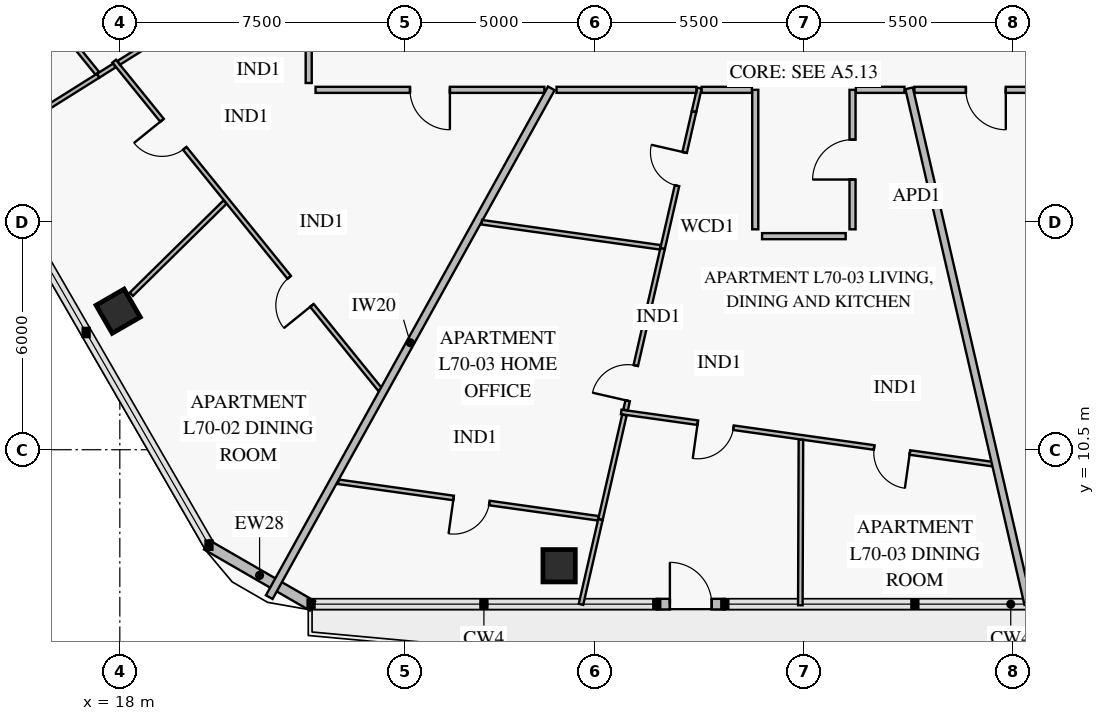
"""IFC4 building model, lengths in metres.
Left out: names, types, materials, properties, quantities, classifications, styles, units other than length and angle.
Written with IfcOpenShell. Run it as: python <this file> out.ifc"""

import sys

from ifc_helpers import new_model, si_unit, direction, frame, frame_2d, origin, origin_2d, place, context, subcontext, project, spatial, rectangle, extrude, element, fill, save


model = new_model("IFC4")
c1 = context("Model", 3, precision=1e-05, world=origin(), true_north=direction((0.0, 1.0)))
c2 = subcontext(c1, "Body", "Model", "MODEL_VIEW")
j1 = project(units=[si_unit("LENGTHUNIT", "METRE"), si_unit("PLANEANGLEUNIT", "RADIAN")], contexts=[c1])
p1 = place(None, origin())
s1 = spatial("IfcSite", under=j1, at=p1, CompositionType="ELEMENT")
p2 = place(p1, origin())
s2 = spatial("IfcBuilding", under=s1, at=p2, CompositionType="ELEMENT")
p3 = place(p2, frame((0.0, 0.0, 276.8)))
s3 = spatial("IfcBuildingStorey", under=s2, at=p3, CompositionType="ELEMENT", Elevation=276.8)
for number, where, z_axis, x_axis in (
    (1, (17.956, 14.145, 0.0), (0.0, 0.0, 1.0), (0.5, -0.866, 0.0)),
    (2, (29.559, 7.446, 0.0), (0.0, 0.0, 1.0), (1.0, 0.0, 0.0)),
):
    element("IfcColumn", number, at=place(p3, frame(where, z_axis=z_axis, x_axis=x_axis)), inside=s3, PredefinedType="COLUMN", context=c2, shape_type="SweptSolid", body=[
        extrude(rectangle(XDim=0.85, YDim=0.85, at=origin_2d()), origin(), (0.0, 0.0, 1.0), 3.55),
    ])
p4 = place(p3, frame((33.919, 6.436, 0.0), z_axis=(0.0, 0.0, 1.0), x_axis=(-1.0, 0.0, 0.0)))
e3 = element("IfcWall", 3, at=p4, inside=s3, PredefinedType="SOLIDWALL", context=c2, shape_type="SweptSolid", body=[
    extrude(rectangle(XDim=1.79, YDim=0.28, at=frame_2d((0.895, 0.0))), origin(), (0.0, 0.0, 1.0), 3.55),
])
p5 = place(p4, frame((0.345, 0.0, 0.0)))
e4 = element("IfcOpeningElement", 4, at=p5, cuts=e3, PredefinedType="OPENING", context=c2, shape_type="SweptSolid", body=[
    extrude(rectangle(XDim=1.1, YDim=2.2, at=frame_2d((0.55, 1.1))), frame((0.0, 0.152, 0.0), z_axis=(0.0, -1.0, 0.0), x_axis=(1.0, 0.0, 0.0)), (0.0, 0.0, 1.0), 0.304),
])
p6 = place(p3, frame((23.07, 6.389, 0.0), z_axis=(0.0, 0.0, 1.0), x_axis=(-0.866028773314, 0.499994163758, 0.0)))
e5 = element("IfcWall", 5, at=p6, inside=s3, PredefinedType="SOLIDWALL", context=c2, shape_type="SweptSolid", body=[
    extrude(rectangle(XDim=3.215, YDim=0.28, at=frame_2d((1.607, 0.0))), origin(), (0.0, 0.0, 1.0), 3.55),
])
p7 = place(p3, frame((17.851, 20.725, 0.0), z_axis=(0.0, 0.0, 1.0), x_axis=(0.629311937349, -0.777152807053, 0.0)))
e6 = element("IfcWall", 6, at=p7, inside=s3, PredefinedType="PARTITIONING", context=c2, shape_type="SweptSolid", body=[
    extrude(rectangle(XDim=11.117, YDim=0.12, at=frame_2d((5.559, 0.0))), origin(), (0.0, 0.0, 1.0), 2.95),
])
p8 = place(p7, frame((2.001, 0.0, 0.0)))
e7 = element("IfcOpeningElement", 7, at=p8, cuts=e6, PredefinedType="OPENING", context=c2, shape_type="SweptSolid", body=[
    extrude(rectangle(XDim=0.95, YDim=2.1, at=frame_2d((0.475, 1.05))), frame((0.0, 0.072, 0.0), z_axis=(0.0, -1.0, 0.0), x_axis=(1.0, 0.0, 0.0)), (0.0, 0.0, 1.0), 0.144),
])
p9 = place(p7, frame((7.319, 0.0, 0.0)))
e8 = element("IfcOpeningElement", 8, at=p9, cuts=e6, PredefinedType="OPENING", context=c2, shape_type="SweptSolid", body=[
    extrude(rectangle(XDim=0.95, YDim=2.1, at=frame_2d((0.475, 1.05))), frame((0.0, 0.072, 0.0), z_axis=(0.0, -1.0, 0.0), x_axis=(1.0, 0.0, 0.0)), (0.0, 0.0, 1.0), 0.144),
])
p10 = place(p3, frame((21.398, 22.833, 0.0), z_axis=(0.0, 0.0, 1.0), x_axis=(-0.84692159597, -0.531717791953, 0.0)))
e9 = element("IfcWall", 9, at=p10, inside=s3, PredefinedType="PARTITIONING", context=c2, shape_type="SweptSolid", body=[
    extrude(rectangle(XDim=4.045, YDim=0.12, at=frame_2d((2.022, 0.0))), origin(), (0.0, 0.0, 1.0), 3.15),
])
p11 = place(p10, frame((1.844, 0.0, 0.0)))
e10 = element("IfcOpeningElement", 10, at=p11, cuts=e9, PredefinedType="OPENING", context=c2, shape_type="SweptSolid", body=[
    extrude(rectangle(XDim=0.95, YDim=2.1, at=frame_2d((0.475, 1.05))), frame((0.0, 0.072, 0.0), z_axis=(0.0, -1.0, 0.0), x_axis=(1.0, 0.0, 0.0)), (0.0, 0.0, 1.0), 0.144),
])
p12 = place(p3, frame((17.857, 20.61, 0.0), z_axis=(0.0, 0.0, 1.0), x_axis=(-0.847021311188, -0.531558932192, 0.0)))
e11 = element("IfcWall", 11, at=p12, inside=s3, PredefinedType="PARTITIONING", context=c2, shape_type="SweptSolid", body=[
    extrude(rectangle(XDim=0.506, YDim=0.12, at=frame_2d((0.253, 0.0))), origin(), (0.0, 0.0, 1.0), 3.55),
])
p13 = place(p3, frame((13.642, 25.055, 0.0), z_axis=(0.0, 0.0, 1.0), x_axis=(0.629353217971, -0.777119377593, 0.0)))
e12 = element("IfcWall", 12, at=p13, inside=s3, PredefinedType="PARTITIONING", context=c2, shape_type="SweptSolid", body=[
    extrude(rectangle(XDim=5.981, YDim=0.12, at=frame_2d((2.99, 0.0))), origin(), (0.0, 0.0, 1.0), 3.55),
])
p14 = place(p13, frame((2.6, 0.0, 0.0)))
e13 = element("IfcOpeningElement", 13, at=p14, cuts=e12, PredefinedType="OPENING", context=c2, shape_type="SweptSolid", body=[
    extrude(rectangle(XDim=0.95, YDim=2.1, at=frame_2d((0.475, 1.05))), frame((0.0, 0.072, 0.0), z_axis=(0.0, -1.0, 0.0), x_axis=(1.0, 0.0, 0.0)), (0.0, 0.0, 1.0), 0.144),
])
p15 = place(p3, frame((23.15, 19.97, 0.0), z_axis=(0.0, 0.0, 1.0), x_axis=(1.0, 0.0, 0.0)))
e14 = element("IfcWall", 14, at=p15, inside=s3, PredefinedType="PARTITIONING", context=c2, shape_type="SweptSolid", body=[
    extrude(rectangle(XDim=6.021, YDim=0.16, at=frame_2d((3.01, 0.0))), origin(), (0.0, 0.0, 1.0), 2.95),
])
p16 = place(p15, frame((2.485, 0.0, 0.0)))
e15 = element("IfcOpeningElement", 15, at=p16, cuts=e14, PredefinedType="OPENING", context=c2, shape_type="SweptSolid", body=[
    extrude(rectangle(XDim=1.05, YDim=2.15, at=frame_2d((0.525, 1.075))), frame((0.0, 0.092, 0.0), z_axis=(0.0, -1.0, 0.0), x_axis=(1.0, 0.0, 0.0)), (0.0, 0.0, 1.0), 0.184),
])
p17 = place(p3, frame((31.193, 11.494, 0.0), z_axis=(0.0, 0.0, 1.0), x_axis=(0.990267998159, -0.139173603183, 0.0)))
e16 = element("IfcWall", 16, at=p17, inside=s3, PredefinedType="PARTITIONING", context=c2, shape_type="SweptSolid", body=[
    extrude(rectangle(XDim=9.855, YDim=0.12, at=frame_2d((4.928, 0.0))), origin(), (0.0, 0.0, 1.0), 3.55),
])
p18 = place(p17, frame((2.034, 0.0, 0.0)))
e17 = element("IfcOpeningElement", 17, at=p18, cuts=e16, PredefinedType="OPENING", context=c2, shape_type="SweptSolid", body=[
    extrude(rectangle(XDim=0.95, YDim=2.1, at=frame_2d((0.475, 1.05))), frame((0.0, 0.072, 0.0), z_axis=(0.0, -1.0, 0.0), x_axis=(1.0, 0.0, 0.0)), (0.0, 0.0, 1.0), 0.144),
])
p19 = place(p17, frame((6.72, 0.0, 0.0)))
e18 = element("IfcOpeningElement", 18, at=p19, cuts=e16, PredefinedType="OPENING", context=c2, shape_type="SweptSolid", body=[
    extrude(rectangle(XDim=0.95, YDim=2.1, at=frame_2d((0.475, 1.05))), frame((0.0, 0.072, 0.0), z_axis=(0.0, -1.0, 0.0), x_axis=(1.0, 0.0, 0.0)), (0.0, 0.0, 1.0), 0.144),
])
p20 = place(p3, frame((33.11, 19.4, 0.0), z_axis=(0.0, 0.0, 1.0), x_axis=(-0.223602016725, -0.974680531311, 0.0)))
e19 = element("IfcWall", 19, at=p20, inside=s3, PredefinedType="PARTITIONING", context=c2, shape_type="SweptSolid", body=[
    extrude(rectangle(XDim=3.701, YDim=0.12, at=frame_2d((1.851, 0.0))), origin(), (0.0, 0.0, 1.0), 3.55),
])
p21 = place(p20, frame((1.104, 0.0, 0.0)))
e20 = element("IfcOpeningElement", 20, at=p21, cuts=e19, PredefinedType="OPENING", context=c2, shape_type="SweptSolid", body=[
    extrude(rectangle(XDim=0.9, YDim=2.1, at=frame_2d((0.45, 1.05))), frame((0.0, 0.072, 0.0), z_axis=(0.0, -1.0, 0.0), x_axis=(1.0, 0.0, 0.0)), (0.0, 0.0, 1.0), 0.144),
])
p22 = place(p3, frame((32.282, 15.792, 0.0), z_axis=(0.0, 0.0, 1.0), x_axis=(-0.223578065354, -0.974686025699, 0.0)))
e21 = element("IfcWall", 21, at=p22, inside=s3, PredefinedType="PARTITIONING", context=c2, shape_type="SweptSolid", body=[
    extrude(rectangle(XDim=4.356, YDim=0.12, at=frame_2d((2.178, 0.0))), origin(), (0.0, 0.0, 1.0), 3.15),
])
p23 = place(p22, frame((3.158, 0.0, 0.0)))
e22 = element("IfcOpeningElement", 22, at=p23, cuts=e21, PredefinedType="OPENING", context=c2, shape_type="SweptSolid", body=[
    extrude(rectangle(XDim=0.95, YDim=2.1, at=frame_2d((0.475, 1.05))), frame((0.0, 0.072, 0.0), z_axis=(0.0, -1.0, 0.0), x_axis=(1.0, 0.0, 0.0)), (0.0, 0.0, 1.0), 0.144),
])
p24 = place(p3, frame((31.278, 11.414, 0.0), z_axis=(0.0, 0.0, 1.0), x_axis=(-0.223608921033, -0.974678947364, 0.0)))
e23 = element("IfcWall", 23, at=p24, inside=s3, PredefinedType="PARTITIONING", context=c2, shape_type="SweptSolid", body=[
    extrude(rectangle(XDim=2.823, YDim=0.12, at=frame_2d((1.412, 0.0))), origin(), (0.0, 0.0, 1.0), 3.55),
])
p25 = place(p3, frame((23.754, 9.656, 0.0), z_axis=(0.0, 0.0, 1.0), x_axis=(0.990271826655, -0.1391463594, 0.0)))
e24 = element("IfcWall", 24, at=p25, inside=s3, PredefinedType="PARTITIONING", context=c2, shape_type="SweptSolid", body=[
    extrude(rectangle(XDim=6.897, YDim=0.12, at=frame_2d((3.449, 0.0))), origin(), (0.0, 0.0, 1.0), 2.93),
])
p26 = place(p25, frame((3.058, 0.0, 0.0)))
e25 = element("IfcOpeningElement", 25, at=p26, cuts=e24, PredefinedType="OPENING", context=c2, shape_type="SweptSolid", body=[
    extrude(rectangle(XDim=0.95, YDim=2.1, at=frame_2d((0.475, 1.05))), frame((0.0, 0.072, 0.0), z_axis=(0.0, -1.0, 0.0), x_axis=(1.0, 0.0, 0.0)), (0.0, 0.0, 1.0), 0.144),
])
p27 = place(p3, frame((37.28, 16.3, 0.0), z_axis=(0.0, 0.0, 1.0), x_axis=(0.0, 1.0, 0.0)))
e26 = element("IfcWall", 26, at=p27, inside=s3, PredefinedType="PARTITIONING", context=c2, shape_type="SweptSolid", body=[
    extrude(rectangle(XDim=3.67, YDim=0.16, at=frame_2d((1.835, 0.0))), origin(), (0.0, 0.0, 1.0), 3.55),
])
p28 = place(p27, frame((1.31, 0.0, 0.0)))
e27 = element("IfcOpeningElement", 27, at=p28, cuts=e26, PredefinedType="OPENING", context=c2, shape_type="SweptSolid", body=[
    extrude(rectangle(XDim=1.05, YDim=2.15, at=frame_2d((0.525, 1.075))), frame((0.0, 0.092, 0.0), z_axis=(0.0, -1.0, 0.0), x_axis=(1.0, 0.0, 0.0)), (0.0, 0.0, 1.0), 0.184),
])
p29 = place(p3, frame((38.909, 19.97, 0.0), z_axis=(0.0, 0.0, 1.0), x_axis=(1.0, 0.0, 0.0)))
e28 = element("IfcWall", 28, at=p29, inside=s3, PredefinedType="PARTITIONING", context=c2, shape_type="SweptSolid", body=[
    extrude(rectangle(XDim=3.759, YDim=0.16, at=frame_2d((1.879, 0.0))), origin(), (0.0, 0.0, 1.0), 2.95),
])
p30 = place(p29, frame((1.354, 0.0, 0.0)))
e29 = element("IfcOpeningElement", 29, at=p30, cuts=e28, PredefinedType="OPENING", context=c2, shape_type="SweptSolid", body=[
    extrude(rectangle(XDim=1.05, YDim=2.15, at=frame_2d((0.525, 1.075))), frame((0.0, 0.092, 0.0), z_axis=(0.0, -1.0, 0.0), x_axis=(1.0, 0.0, 0.0)), (0.0, 0.0, 1.0), 0.184),
])
p31 = place(p3, frame((20.768, 17.015, 0.0), z_axis=(0.0, 0.0, 1.0), x_axis=(-0.71287305113, -0.701293100617, 0.0)))
e30 = element("IfcWall", 30, at=p31, inside=s3, PredefinedType="PARTITIONING", context=c2, shape_type="SweptSolid", body=[
    extrude(rectangle(XDim=3.458, YDim=0.12, at=frame_2d((1.729, 0.0))), origin(), (0.0, 0.0, 1.0), 2.95),
])
p32 = place(p3, frame((17.428, 20.341, 0.0), z_axis=(0.0, 0.0, 1.0), x_axis=(-0.846935423542, -0.531695766722, 0.0)))
e31 = element("IfcWall", 31, at=p32, inside=s3, PredefinedType="PARTITIONING", context=c2, shape_type="SweptSolid", body=[
    extrude(rectangle(XDim=3.658, YDim=0.12, at=frame_2d((1.829, 0.0))), origin(), (0.0, 0.0, 1.0), 2.93),
])
p33 = place(p3, frame((29.354, 20.01, 0.0), z_axis=(0.0, 0.0, 1.0), x_axis=(-0.48480997026, -0.874619513124, 0.0)))
e32 = element("IfcWall", 32, at=p33, inside=s3, PredefinedType="PARTITIONING", context=c2, shape_type="SweptSolid", body=[
    extrude(rectangle(XDim=15.309, YDim=0.2, at=frame_2d((7.654, 0.0))), origin(), (0.0, 0.0, 1.0), 2.93),
])
p34 = place(p3, frame((35.922, 10.761, 0.0), z_axis=(0.0, 0.0, 1.0), x_axis=(-0.003644495, -0.999993358806, 0.0)))
e33 = element("IfcWall", 33, at=p34, inside=s3, PredefinedType="PARTITIONING", context=c2, shape_type="SweptSolid", body=[
    extrude(rectangle(XDim=4.354, YDim=0.12, at=frame_2d((2.177, 0.0))), origin(), (0.0, 0.0, 1.0), 2.93),
])
p35 = place(p3, frame((33.25, 20.014, 0.0), z_axis=(0.0, 0.0, 1.0), x_axis=(-0.223445142746, -0.974716506572, 0.0)))
e34 = element("IfcWall", 34, at=p35, inside=s3, PredefinedType="PARTITIONING", context=c2, shape_type="SweptSolid", body=[
    extrude(rectangle(XDim=0.63, YDim=0.12, at=frame_2d((0.315, 0.0))), origin(), (0.0, 0.0, 1.0), 3.55),
])
p36 = place(p3, frame((30.646, 8.662, 0.0), z_axis=(0.0, 0.0, 1.0), x_axis=(-0.223635915936, -0.974672753853, 0.0)))
e35 = element("IfcWall", 35, at=p36, inside=s3, PredefinedType="PARTITIONING", context=c2, shape_type="SweptSolid", body=[
    extrude(rectangle(XDim=2.288, YDim=0.12, at=frame_2d((1.144, 0.0))), origin(), (0.0, 0.0, 1.0), 2.93),
])
p37 = place(p3, frame((27.524, 16.486, 0.0), z_axis=(0.0, 0.0, 1.0), x_axis=(0.990277311459, -0.139107319759, 0.0)))
e36 = element("IfcWall", 36, at=p37, inside=s3, PredefinedType="PARTITIONING", context=c2, shape_type="SweptSolid", body=[
    extrude(rectangle(XDim=4.742, YDim=0.12, at=frame_2d((2.371, 0.0))), origin(), (0.0, 0.0, 1.0), 2.95),
])
p38 = place(p3, frame((38.768, 20.01, 0.0), z_axis=(0.0, 0.0, 1.0), x_axis=(0.224954220799, -0.974369333746, 0.0)))
e37 = element("IfcWall", 37, at=p38, inside=s3, PredefinedType="PARTITIONING", context=c2, shape_type="SweptSolid", body=[
    extrude(rectangle(XDim=13.931, YDim=0.2, at=frame_2d((6.965, 0.0))), origin(), (0.0, 0.0, 1.0), 2.93),
])
p39 = place(p3, frame((22.97, 23.74, 0.0), z_axis=(0.0, 0.0, 1.0), x_axis=(0.0, -1.0, 0.0)))
e38 = element("IfcWall", 38, at=p39, inside=s3, PredefinedType="PARTITIONING", context=c2, shape_type="SweptSolid", body=[
    extrude(rectangle(XDim=3.59, YDim=0.16, at=frame_2d((1.795, 0.0))), origin(), (0.0, 0.0, 1.0), 3.55),
])
p40 = place(p3, frame((34.72, 19.97, 0.0), z_axis=(0.0, 0.0, 1.0), x_axis=(0.0, -1.0, 0.0)))
e39 = element("IfcWall", 39, at=p40, inside=s3, PredefinedType="PARTITIONING", context=c2, shape_type="SweptSolid", body=[
    extrude(rectangle(XDim=3.67, YDim=0.16, at=frame_2d((1.835, 0.0))), origin(), (0.0, 0.0, 1.0), 3.55),
])
p41 = place(p3, frame((34.9, 16.12, 0.0), z_axis=(0.0, 0.0, 1.0), x_axis=(1.0, 0.0, 0.0)))
e40 = element("IfcWall", 40, at=p41, inside=s3, PredefinedType="PARTITIONING", context=c2, shape_type="SweptSolid", body=[
    extrude(rectangle(XDim=2.2, YDim=0.16, at=frame_2d((1.1, 0.0))), origin(), (0.0, 0.0, 1.0), 3.55),
])
p42 = place(p3, frame((33.31, 19.97, 0.0), z_axis=(0.0, 0.0, 1.0), x_axis=(1.0, 0.0, 0.0)))
e41 = element("IfcWall", 41, at=p42, inside=s3, PredefinedType="PARTITIONING", context=c2, shape_type="SweptSolid", body=[
    extrude(rectangle(XDim=1.322, YDim=0.16, at=frame_2d((0.661, 0.0))), origin(), (0.0, 0.0, 1.0), 3.55),
])
p43 = place(p3, frame((37.368, 19.97, 0.0), z_axis=(0.0, 0.0, 1.0), x_axis=(1.0, 0.0, 0.0)))
e42 = element("IfcWall", 42, at=p43, inside=s3, PredefinedType="PARTITIONING", context=c2, shape_type="SweptSolid", body=[
    extrude(rectangle(XDim=1.279, YDim=0.16, at=frame_2d((0.639, 0.0))), origin(), (0.0, 0.0, 1.0), 3.55),
])
p44 = place(p3, frame((29.491, 19.97, 0.0), z_axis=(0.0, 0.0, 1.0), x_axis=(1.0, 0.0, 0.0)))
e43 = element("IfcWall", 43, at=p44, inside=s3, PredefinedType="PARTITIONING", context=c2, shape_type="SweptSolid", body=[
    extrude(rectangle(XDim=3.68, YDim=0.16, at=frame_2d((1.84, 0.0))), origin(), (0.0, 0.0, 1.0), 2.95),
])
p45 = place(p5, frame((1.1, 0.0, 0.0), z_axis=(0.0, 0.0, 1.0), x_axis=(-1.0, 0.0, 0.0)))
e44 = element("IfcDoor", 44, at=p45, inside=s3, OperationType="SINGLE_SWING_LEFT", PredefinedType="DOOR", context=c2, shape_type="SweptSolid", body=[
    extrude(rectangle(XDim=1.1, YDim=2.2, at=frame_2d((0.55, 1.1))), frame((0.0, 0.025, 0.0), z_axis=(0.0, -1.0, 0.0), x_axis=(1.0, 0.0, 0.0)), (0.0, 0.0, 1.0), 0.05),
])
fill(e4, e44)
p46 = place(p8, frame((0.95, 0.0, 0.0), z_axis=(0.0, 0.0, 1.0), x_axis=(-1.0, 0.0, 0.0)))
e45 = element("IfcDoor", 45, at=p46, inside=s3, OperationType="SINGLE_SWING_RIGHT", PredefinedType="DOOR", context=c2, shape_type="SweptSolid", body=[
    extrude(rectangle(XDim=0.95, YDim=2.1, at=frame_2d((0.475, 1.05))), frame((0.0, 0.025, 0.0), z_axis=(0.0, -1.0, 0.0), x_axis=(1.0, 0.0, 0.0)), (0.0, 0.0, 1.0), 0.05),
])
fill(e7, e45)
p47 = place(p9, frame((0.95, 0.0, 0.0), z_axis=(0.0, 0.0, 1.0), x_axis=(-1.0, 0.0, 0.0)))
e46 = element("IfcDoor", 46, at=p47, inside=s3, OperationType="SINGLE_SWING_LEFT", PredefinedType="DOOR", context=c2, shape_type="SweptSolid", body=[
    extrude(rectangle(XDim=0.95, YDim=2.1, at=frame_2d((0.475, 1.05))), frame((0.0, 0.025, 0.0), z_axis=(0.0, -1.0, 0.0), x_axis=(1.0, 0.0, 0.0)), (0.0, 0.0, 1.0), 0.05),
])
fill(e8, e46)
p48 = place(p16, frame((1.05, 0.0, 0.0), z_axis=(0.0, 0.0, 1.0), x_axis=(-1.0, 0.0, 0.0)))
e47 = element("IfcDoor", 47, at=p48, inside=s3, OperationType="SINGLE_SWING_LEFT", PredefinedType="DOOR", context=c2, shape_type="SweptSolid", body=[
    extrude(rectangle(XDim=1.05, YDim=2.15, at=frame_2d((0.525, 1.075))), frame((0.0, 0.025, 0.0), z_axis=(0.0, -1.0, 0.0), x_axis=(1.0, 0.0, 0.0)), (0.0, 0.0, 1.0), 0.05),
])
fill(e15, e47)
p49 = place(p18, frame((0.95, 0.0, 0.0), z_axis=(0.0, 0.0, 1.0), x_axis=(-1.0, 0.0, 0.0)))
e48 = element("IfcDoor", 48, at=p49, inside=s3, OperationType="SINGLE_SWING_RIGHT", PredefinedType="DOOR", context=c2, shape_type="SweptSolid", body=[
    extrude(rectangle(XDim=0.95, YDim=2.1, at=frame_2d((0.475, 1.05))), frame((0.0, 0.025, 0.0), z_axis=(0.0, -1.0, 0.0), x_axis=(1.0, 0.0, 0.0)), (0.0, 0.0, 1.0), 0.05),
])
fill(e17, e48)
p50 = place(p19, frame((0.95, 0.0, 0.0), z_axis=(0.0, 0.0, 1.0), x_axis=(-1.0, 0.0, 0.0)))
e49 = element("IfcDoor", 49, at=p50, inside=s3, OperationType="SINGLE_SWING_LEFT", PredefinedType="DOOR", context=c2, shape_type="SweptSolid", body=[
    extrude(rectangle(XDim=0.95, YDim=2.1, at=frame_2d((0.475, 1.05))), frame((0.0, 0.025, 0.0), z_axis=(0.0, -1.0, 0.0), x_axis=(1.0, 0.0, 0.0)), (0.0, 0.0, 1.0), 0.05),
])
fill(e18, e49)
p51 = place(p21, frame((0.9, 0.0, 0.0), z_axis=(0.0, 0.0, 1.0), x_axis=(-1.0, 0.0, 0.0)))
e50 = element("IfcDoor", 50, at=p51, inside=s3, OperationType="SINGLE_SWING_RIGHT", PredefinedType="DOOR", context=c2, shape_type="SweptSolid", body=[
    extrude(rectangle(XDim=0.9, YDim=2.1, at=frame_2d((0.45, 1.05))), frame((0.0, 0.025, 0.0), z_axis=(0.0, -1.0, 0.0), x_axis=(1.0, 0.0, 0.0)), (0.0, 0.0, 1.0), 0.05),
])
fill(e20, e50)
p52 = place(p23, frame((0.95, 0.0, 0.0), z_axis=(0.0, 0.0, 1.0), x_axis=(-1.0, 0.0, 0.0)))
e51 = element("IfcDoor", 51, at=p52, inside=s3, OperationType="SINGLE_SWING_LEFT", PredefinedType="DOOR", context=c2, shape_type="SweptSolid", body=[
    extrude(rectangle(XDim=0.95, YDim=2.1, at=frame_2d((0.475, 1.05))), frame((0.0, 0.025, 0.0), z_axis=(0.0, -1.0, 0.0), x_axis=(1.0, 0.0, 0.0)), (0.0, 0.0, 1.0), 0.05),
])
fill(e22, e51)
p53 = place(p26, frame((0.95, 0.0, 0.0), z_axis=(0.0, 0.0, 1.0), x_axis=(-1.0, 0.0, 0.0)))
e52 = element("IfcDoor", 52, at=p53, inside=s3, OperationType="SINGLE_SWING_RIGHT", PredefinedType="DOOR", context=c2, shape_type="SweptSolid", body=[
    extrude(rectangle(XDim=0.95, YDim=2.1, at=frame_2d((0.475, 1.05))), frame((0.0, 0.025, 0.0), z_axis=(0.0, -1.0, 0.0), x_axis=(1.0, 0.0, 0.0)), (0.0, 0.0, 1.0), 0.05),
])
fill(e25, e52)
p54 = place(p28, origin())
e53 = element("IfcDoor", 53, at=p54, inside=s3, OperationType="SINGLE_SWING_LEFT", PredefinedType="DOOR", context=c2, shape_type="SweptSolid", body=[
    extrude(rectangle(XDim=1.05, YDim=2.15, at=frame_2d((0.525, 1.075))), frame((0.0, 0.025, 0.0), z_axis=(0.0, -1.0, 0.0), x_axis=(1.0, 0.0, 0.0)), (0.0, 0.0, 1.0), 0.05),
])
fill(e27, e53)
p55 = place(p30, frame((1.05, 0.0, 0.0), z_axis=(0.0, 0.0, 1.0), x_axis=(-1.0, 0.0, 0.0)))
e54 = element("IfcDoor", 54, at=p55, inside=s3, OperationType="SINGLE_SWING_LEFT", PredefinedType="DOOR", context=c2, shape_type="SweptSolid", body=[
    extrude(rectangle(XDim=1.05, YDim=2.15, at=frame_2d((0.525, 1.075))), frame((0.0, 0.025, 0.0), z_axis=(0.0, -1.0, 0.0), x_axis=(1.0, 0.0, 0.0)), (0.0, 0.0, 1.0), 0.05),
])
fill(e29, e54)
save(model, sys.argv[1])
